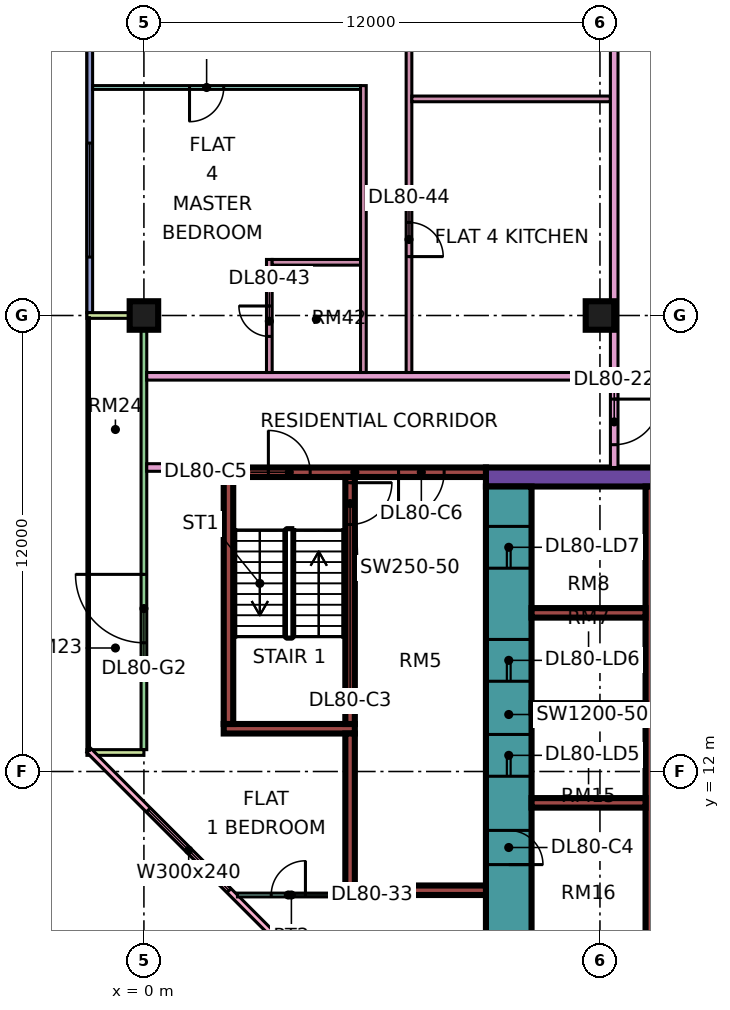
"""IFC4 building model, lengths in metres.
Left out: names, types, materials, properties, quantities, classifications, styles, units other than length and angle.
Written with IfcOpenShell. Run it as: python <this file> out.ifc"""

import sys

from ifc_helpers import new_model, si_unit, direction, frame, frame_2d, origin, origin_2d, place, context, subcontext, project, spatial, rectangle, extrude, element, fill, save


model = new_model("IFC4")
c1 = context("Model", 3, precision=1e-05, world=origin(), true_north=direction((0.0, 1.0)))
c2 = subcontext(c1, "Body", "Model", "MODEL_VIEW")
j1 = project(units=[si_unit("LENGTHUNIT", "METRE"), si_unit("PLANEANGLEUNIT", "RADIAN")], contexts=[c1])
p1 = place(None, origin())
s1 = spatial("IfcSite", under=j1, at=p1, CompositionType="ELEMENT")
p2 = place(p1, origin())
s2 = spatial("IfcBuilding", under=s1, at=p2, CompositionType="ELEMENT")
p3 = place(p2, frame((0.0, 0.0, 346.4)))
s3 = spatial("IfcBuildingStorey", under=s2, at=p3, CompositionType="ELEMENT", Elevation=346.4)
for number, where, z_axis, x_axis in (
    (1, (0.0, 24.0, 0.0), (0.0, 0.0, 1.0), (1.0, 0.0, 0.0)),
    (2, (12.0, 24.0, 0.0), (0.0, 0.0, 1.0), (1.0, 0.0, 0.0)),
):
    element("IfcColumn", number, at=place(p3, frame(where, z_axis=z_axis, x_axis=x_axis)), inside=s3, PredefinedType="COLUMN", context=c2, shape_type="SweptSolid", body=[
        extrude(rectangle(XDim=0.75, YDim=0.75, at=origin_2d()), origin(), (0.0, 0.0, 1.0), 3.75),
    ])
p4 = place(p3, frame((9.0, 19.75, 0.0), z_axis=(0.0, 0.0, 1.0), x_axis=(1.0, 0.0, 0.0)))
e3 = element("IfcWall", 3, at=p4, inside=s3, PredefinedType="SHEAR", context=c2, shape_type="SweptSolid", body=[
    extrude(rectangle(XDim=25.0, YDim=0.5, at=frame_2d((12.5, 0.0))), origin(), (0.0, 0.0, 1.0), 3.75),
])
p5 = place(p4, frame((19.1, 0.0, 0.0)))
e4 = element("IfcOpeningElement", 4, at=p5, cuts=e3, PredefinedType="OPENING", context=c2, shape_type="SweptSolid", body=[
    extrude(rectangle(XDim=1.8, YDim=2.4, at=frame_2d((0.9, 1.2))), frame((0.0, 0.26, 0.0), z_axis=(0.0, -1.0, 0.0), x_axis=(1.0, 0.0, 0.0)), (0.0, 0.0, 1.0), 0.52),
])
p6 = place(p3, frame((9.6, 7.5, 0.0), z_axis=(0.0, 0.0, 1.0), x_axis=(0.0, 1.0, 0.0)))
e5 = element("IfcWall", 5, at=p6, inside=s3, PredefinedType="SHEAR", context=c2, shape_type="SweptSolid", body=[
    extrude(rectangle(XDim=12.0, YDim=1.2, at=frame_2d((6.0, 0.0))), origin(), (0.0, 0.0, 1.0), 3.75),
])
p7 = place(p6, frame((4.375, 0.0, 0.0)))
e6 = element("IfcOpeningElement", 6, at=p7, cuts=e5, PredefinedType="OPENING", context=c2, shape_type="SweptSolid", body=[
    extrude(rectangle(XDim=1.1, YDim=2.2, at=frame_2d((0.55, 1.1))), frame((0.0, 0.61, 0.0), z_axis=(0.0, -1.0, 0.0), x_axis=(1.0, 0.0, 0.0)), (0.0, 0.0, 1.0), 1.22),
])
p8 = place(p6, frame((6.875, 0.0, 0.0)))
e7 = element("IfcOpeningElement", 7, at=p8, cuts=e5, PredefinedType="OPENING", context=c2, shape_type="SweptSolid", body=[
    extrude(rectangle(XDim=1.1, YDim=2.2, at=frame_2d((0.55, 1.1))), frame((0.0, 0.61, 0.0), z_axis=(0.0, -1.0, 0.0), x_axis=(1.0, 0.0, 0.0)), (0.0, 0.0, 1.0), 1.22),
])
p9 = place(p6, frame((9.85, 0.0, 0.0)))
e8 = element("IfcOpeningElement", 8, at=p9, cuts=e5, PredefinedType="OPENING", context=c2, shape_type="SweptSolid", body=[
    extrude(rectangle(XDim=1.1, YDim=2.2, at=frame_2d((0.55, 1.1))), frame((0.0, 0.61, 0.0), z_axis=(0.0, -1.0, 0.0), x_axis=(1.0, 0.0, 0.0)), (0.0, 0.0, 1.0), 1.22),
])
p10 = place(p6, frame((2.05, 0.0, 0.0)))
e9 = element("IfcOpeningElement", 9, at=p10, cuts=e5, PredefinedType="OPENING", context=c2, shape_type="SweptSolid", body=[
    extrude(rectangle(XDim=0.9, YDim=2.1, at=frame_2d((0.45, 1.05))), frame((0.0, 0.61, 0.0), z_axis=(0.0, -1.0, 0.0), x_axis=(1.0, 0.0, 0.0)), (0.0, 0.0, 1.0), 1.22),
])
p11 = place(p3, frame((13.325, 7.5, 0.0), z_axis=(0.0, 0.0, 1.0), x_axis=(0.0, 1.0, 0.0)))
e10 = element("IfcWall", 10, at=p11, inside=s3, PredefinedType="SHEAR", context=c2, shape_type="SweptSolid", body=[
    extrude(rectangle(XDim=12.0, YDim=0.25, at=frame_2d((6.0, 0.0))), origin(), (0.0, 0.0, 1.0), 3.75),
])
for number, where, z_axis, x_axis in (
    (11, (10.2, 11.175, 0.0), (0.0, 0.0, 1.0), (1.0, 0.0, 0.0)),
    (12, (10.2, 13.675, 0.0), (0.0, 0.0, 1.0), (1.0, 0.0, 0.0)),
    (13, (10.2, 16.175, 0.0), (0.0, 0.0, 1.0), (1.0, 0.0, 0.0)),
):
    element("IfcWall", number, at=place(p3, frame(where, z_axis=z_axis, x_axis=x_axis)), inside=s3, PredefinedType="SHEAR", context=c2, shape_type="SweptSolid", body=[
        extrude(rectangle(XDim=3.0, YDim=0.25, at=frame_2d((1.5, 0.0))), origin(), (0.0, 0.0, 1.0), 3.75),
    ])
p12 = place(p3, frame((2.1, 19.875, 0.0), z_axis=(0.0, 0.0, 1.0), x_axis=(1.0, 0.0, 0.0)))
e14 = element("IfcWall", 14, at=p12, inside=s3, PredefinedType="SHEAR", context=c2, shape_type="SweptSolid", body=[
    extrude(rectangle(XDim=6.9, YDim=0.25, at=frame_2d((3.45, 0.0))), origin(), (0.0, 0.0, 1.0), 3.75),
])
p13 = place(p12, frame((1.175, 0.0, 0.0)))
e15 = element("IfcOpeningElement", 15, at=p13, cuts=e14, PredefinedType="OPENING", context=c2, shape_type="SweptSolid", body=[
    extrude(rectangle(XDim=1.1, YDim=2.2, at=frame_2d((0.55, 1.1))), frame((0.0, 0.135, 0.0), z_axis=(0.0, -1.0, 0.0), x_axis=(1.0, 0.0, 0.0)), (0.0, 0.0, 1.0), 0.27),
])
p14 = place(p12, frame((4.6, 0.0, 0.0)))
e16 = element("IfcOpeningElement", 16, at=p14, cuts=e14, PredefinedType="OPENING", context=c2, shape_type="SweptSolid", body=[
    extrude(rectangle(XDim=1.2, YDim=2.2, at=frame_2d((0.6, 1.1))), frame((0.0, 0.135, 0.0), z_axis=(0.0, -1.0, 0.0), x_axis=(1.0, 0.0, 0.0)), (0.0, 0.0, 1.0), 0.27),
])
p15 = place(p3, frame((2.1, 13.125, 0.0), z_axis=(0.0, 0.0, 1.0), x_axis=(1.0, 0.0, 0.0)))
e17 = element("IfcWall", 17, at=p15, inside=s3, PredefinedType="SHEAR", context=c2, shape_type="SweptSolid", body=[
    extrude(rectangle(XDim=3.45, YDim=0.25, at=frame_2d((1.725, 0.0))), origin(), (0.0, 0.0, 1.0), 3.75),
])
p16 = place(p3, frame((2.225, 13.25, 0.0), z_axis=(0.0, 0.0, 1.0), x_axis=(0.0, 1.0, 0.0)))
e18 = element("IfcWall", 18, at=p16, inside=s3, PredefinedType="SHEAR", context=c2, shape_type="SweptSolid", body=[
    extrude(rectangle(XDim=6.5, YDim=0.25, at=frame_2d((3.25, 0.0))), origin(), (0.0, 0.0, 1.0), 3.75),
])
p17 = place(p3, frame((5.425, 13.25, 0.0), z_axis=(0.0, 0.0, 1.0), x_axis=(0.0, 1.0, 0.0)))
e19 = element("IfcWall", 19, at=p17, inside=s3, PredefinedType="SHEAR", context=c2, shape_type="SweptSolid", body=[
    extrude(rectangle(XDim=6.5, YDim=0.25, at=frame_2d((3.25, 0.0))), origin(), (0.0, 0.0, 1.0), 3.75),
])
p18 = place(p17, frame((5.25, 0.0, 0.0)))
e20 = element("IfcOpeningElement", 20, at=p18, cuts=e19, PredefinedType="OPENING", context=c2, shape_type="SweptSolid", body=[
    extrude(rectangle(XDim=1.1, YDim=2.2, at=frame_2d((0.55, 1.1))), frame((0.0, 0.135, 0.0), z_axis=(0.0, -1.0, 0.0), x_axis=(1.0, 0.0, 0.0)), (0.0, 0.0, 1.0), 0.27),
])
p19 = place(p3, frame((5.3, 8.875, 0.0), z_axis=(0.0, 0.0, 1.0), x_axis=(1.0, 0.0, 0.0)))
e21 = element("IfcWall", 21, at=p19, inside=s3, PredefinedType="SHEAR", context=c2, shape_type="SweptSolid", body=[
    extrude(rectangle(XDim=3.7, YDim=0.25, at=frame_2d((1.85, 0.0))), origin(), (0.0, 0.0, 1.0), 3.75),
])
p20 = place(p3, frame((5.425, 9.0, 0.0), z_axis=(0.0, 0.0, 1.0), x_axis=(0.0, 1.0, 0.0)))
e22 = element("IfcWall", 22, at=p20, inside=s3, PredefinedType="SHEAR", context=c2, shape_type="SweptSolid", body=[
    extrude(rectangle(XDim=4.0, YDim=0.25, at=frame_2d((2.0, 0.0))), origin(), (0.0, 0.0, 1.0), 3.75),
])
p21 = place(p3, frame((-1.425, 35.925, 0.0), z_axis=(0.0, 0.0, 1.0), x_axis=(0.0, -1.0, 0.0)))
e23 = element("IfcWall", 23, at=p21, inside=s3, PredefinedType="SOLIDWALL", context=c2, shape_type="SweptSolid", body=[
    extrude(rectangle(XDim=11.85, YDim=0.15, at=frame_2d((5.925, 0.0))), origin(), (0.0, 0.0, 1.0), 3.35),
])
p22 = place(p21, frame((1.462, 0.0, 0.45)))
e24 = element("IfcOpeningElement", 24, at=p22, cuts=e23, PredefinedType="OPENING", context=c2, shape_type="SweptSolid", body=[
    extrude(rectangle(XDim=3.0, YDim=2.4, at=frame_2d((1.5, 1.2))), frame((0.0, 0.085, 0.0), z_axis=(0.0, -1.0, 0.0), x_axis=(1.0, 0.0, 0.0)), (0.0, 0.0, 1.0), 0.17),
])
p23 = place(p21, frame((7.387, 0.0, 0.45)))
e25 = element("IfcOpeningElement", 25, at=p23, cuts=e23, PredefinedType="OPENING", context=c2, shape_type="SweptSolid", body=[
    extrude(rectangle(XDim=3.0, YDim=2.4, at=frame_2d((1.5, 1.2))), frame((0.0, 0.085, 0.0), z_axis=(0.0, -1.0, 0.0), x_axis=(1.0, 0.0, 0.0)), (0.0, 0.0, 1.0), 0.17),
])
p24 = place(p3, frame((0.0, 23.925, 0.0), z_axis=(0.0, 0.0, 1.0), x_axis=(0.0, -1.0, 0.0)))
e26 = element("IfcWall", 26, at=p24, inside=s3, PredefinedType="SOLIDWALL", context=c2, shape_type="SweptSolid", body=[
    extrude(rectangle(XDim=11.35, YDim=0.15, at=frame_2d((5.675, 0.0))), origin(), (0.0, 0.0, 1.0), 3.35),
])
p25 = place(p24, frame((6.738, 0.0, 0.0)))
e27 = element("IfcOpeningElement", 27, at=p25, cuts=e26, PredefinedType="OPENING", context=c2, shape_type="SweptSolid", body=[
    extrude(rectangle(XDim=1.8, YDim=2.4, at=frame_2d((0.9, 1.2))), frame((0.0, 0.085, 0.0), z_axis=(0.0, -1.0, 0.0), x_axis=(1.0, 0.0, 0.0)), (0.0, 0.0, 1.0), 0.17),
])
for number, where, z_axis, x_axis in (
    (28, (-1.5, 24.0, 0.0), (0.0, 0.0, 1.0), (1.0, 0.0, 0.0)),
    (29, (-1.5, 12.5, 0.0), (0.0, 0.0, 1.0), (1.0, 0.0, 0.0)),
):
    element("IfcWall", number, at=place(p3, frame(where, z_axis=z_axis, x_axis=x_axis)), inside=s3, PredefinedType="SOLIDWALL", context=c2, shape_type="SweptSolid", body=[
        extrude(rectangle(XDim=1.5, YDim=0.15, at=frame_2d((0.75, 0.0))), origin(), (0.0, 0.0, 1.0), 3.35),
    ])
p26 = place(p3, frame((-1.447, 12.553, 0.0), z_axis=(0.0, 0.0, 1.0), x_axis=(0.707106781187, -0.707106781187, 0.0)))
e30 = element("IfcWall", 30, at=p26, inside=s3, PredefinedType="SOLIDWALL", context=c2, shape_type="SweptSolid", body=[
    extrude(rectangle(XDim=19.799, YDim=0.15, at=frame_2d((9.899, 0.0))), origin(), (0.0, 0.0, 1.0), 3.35),
])
p27 = place(p26, frame((2.212, 0.0, 0.45)))
e31 = element("IfcOpeningElement", 31, at=p27, cuts=e30, PredefinedType="OPENING", context=c2, shape_type="SweptSolid", body=[
    extrude(rectangle(XDim=3.0, YDim=2.4, at=frame_2d((1.5, 1.2))), frame((0.0, 0.085, 0.0), z_axis=(0.0, -1.0, 0.0), x_axis=(1.0, 0.0, 0.0)), (0.0, 0.0, 1.0), 0.17),
])
p28 = place(p26, frame((10.216, 0.0, 0.45)))
e32 = element("IfcOpeningElement", 32, at=p28, cuts=e30, PredefinedType="OPENING", context=c2, shape_type="SweptSolid", body=[
    extrude(rectangle(XDim=3.0, YDim=2.4, at=frame_2d((1.5, 1.2))), frame((0.0, 0.085, 0.0), z_axis=(0.0, -1.0, 0.0), x_axis=(1.0, 0.0, 0.0)), (0.0, 0.0, 1.0), 0.17),
])
p29 = place(p3, frame((-1.35, 30.0, 0.0), z_axis=(0.0, 0.0, 1.0), x_axis=(1.0, 0.0, 0.0)))
e33 = element("IfcWall", 33, at=p29, inside=s3, PredefinedType="PARTITIONING", context=c2, shape_type="SweptSolid", body=[
    extrude(rectangle(XDim=7.05, YDim=0.1, at=frame_2d((3.525, 0.0))), origin(), (0.0, 0.0, 1.0), 3.35),
])
p30 = place(p29, frame((2.55, 0.0, 0.0)))
e34 = element("IfcOpeningElement", 34, at=p30, cuts=e33, PredefinedType="OPENING", context=c2, shape_type="SweptSolid", body=[
    extrude(rectangle(XDim=0.9, YDim=2.1, at=frame_2d((0.45, 1.05))), frame((0.0, 0.06, 0.0), z_axis=(0.0, -1.0, 0.0), x_axis=(1.0, 0.0, 0.0)), (0.0, 0.0, 1.0), 0.12),
])
p31 = place(p3, frame((0.074, 20.0, 0.0), z_axis=(0.0, 0.0, 1.0), x_axis=(1.0, 0.0, 0.0)))
e35 = element("IfcWall", 35, at=p31, inside=s3, PredefinedType="PARTITIONING", context=c2, shape_type="SweptSolid", body=[
    extrude(rectangle(XDim=2.026, YDim=0.2, at=frame_2d((1.013, 0.0))), origin(), (0.0, 0.0, 1.0), 3.35),
])
p32 = place(p3, frame((0.074, 22.4, 0.0), z_axis=(0.0, 0.0, 1.0), x_axis=(1.0, 0.0, 0.0)))
e36 = element("IfcWall", 36, at=p32, inside=s3, PredefinedType="PARTITIONING", context=c2, shape_type="SweptSolid", body=[
    extrude(rectangle(XDim=12.201, YDim=0.2, at=frame_2d((6.101, 0.0))), origin(), (0.0, 0.0, 1.0), 3.35),
])
p33 = place(p3, frame((2.461, 8.75, 0.0), z_axis=(0.0, 0.0, 1.0), x_axis=(1.0, 0.0, 0.0)))
e37 = element("IfcWall", 37, at=p33, inside=s3, PredefinedType="PARTITIONING", context=c2, shape_type="SweptSolid", body=[
    extrude(rectangle(XDim=2.839, YDim=0.1, at=frame_2d((1.419, 0.0))), origin(), (0.0, 0.0, 1.0), 3.35),
])
p34 = place(p33, frame((0.889, 0.0, 0.0)))
e38 = element("IfcOpeningElement", 38, at=p34, cuts=e37, PredefinedType="OPENING", context=c2, shape_type="SweptSolid", body=[
    extrude(rectangle(XDim=0.9, YDim=2.1, at=frame_2d((0.45, 1.05))), frame((0.0, 0.06, 0.0), z_axis=(0.0, -1.0, 0.0), x_axis=(1.0, 0.0, 0.0)), (0.0, 0.0, 1.0), 0.12),
])
p35 = place(p3, frame((3.3, 22.5, 0.0), z_axis=(0.0, 0.0, 1.0), x_axis=(0.0, 1.0, 0.0)))
e39 = element("IfcWall", 39, at=p35, inside=s3, PredefinedType="PARTITIONING", context=c2, shape_type="SweptSolid", body=[
    extrude(rectangle(XDim=2.975, YDim=0.15, at=frame_2d((1.488, 0.0))), origin(), (0.0, 0.0, 1.0), 3.35),
])
p36 = place(p35, frame((0.95, 0.0, 0.0)))
e40 = element("IfcOpeningElement", 40, at=p36, cuts=e39, PredefinedType="OPENING", context=c2, shape_type="SweptSolid", body=[
    extrude(rectangle(XDim=0.8, YDim=2.1, at=frame_2d((0.4, 1.05))), frame((0.0, 0.085, 0.0), z_axis=(0.0, -1.0, 0.0), x_axis=(1.0, 0.0, 0.0)), (0.0, 0.0, 1.0), 0.17),
])
p37 = place(p3, frame((3.375, 25.4, 0.0), z_axis=(0.0, 0.0, 1.0), x_axis=(1.0, 0.0, 0.0)))
e41 = element("IfcWall", 41, at=p37, inside=s3, PredefinedType="PARTITIONING", context=c2, shape_type="SweptSolid", body=[
    extrude(rectangle(XDim=2.325, YDim=0.15, at=frame_2d((1.163, 0.0))), origin(), (0.0, 0.0, 1.0), 3.35),
])
p38 = place(p3, frame((5.775, 22.5, 0.0), z_axis=(0.0, 0.0, 1.0), x_axis=(0.0, 1.0, 0.0)))
e42 = element("IfcWall", 42, at=p38, inside=s3, PredefinedType="PARTITIONING", context=c2, shape_type="SweptSolid", body=[
    extrude(rectangle(XDim=7.55, YDim=0.15, at=frame_2d((3.775, 0.0))), origin(), (0.0, 0.0, 1.0), 3.35),
])
p39 = place(p3, frame((6.975, 22.5, 0.0), z_axis=(0.0, 0.0, 1.0), x_axis=(0.0, 1.0, 0.0)))
e43 = element("IfcWall", 43, at=p39, inside=s3, PredefinedType="PARTITIONING", context=c2, shape_type="SweptSolid", body=[
    extrude(rectangle(XDim=11.175, YDim=0.15, at=frame_2d((5.587, 0.0))), origin(), (0.0, 0.0, 1.0), 3.35),
])
p40 = place(p39, frame((3.05, 0.0, 0.0)))
e44 = element("IfcOpeningElement", 44, at=p40, cuts=e43, PredefinedType="OPENING", context=c2, shape_type="SweptSolid", body=[
    extrude(rectangle(XDim=0.9, YDim=2.1, at=frame_2d((0.45, 1.05))), frame((0.0, 0.085, 0.0), z_axis=(0.0, -1.0, 0.0), x_axis=(1.0, 0.0, 0.0)), (0.0, 0.0, 1.0), 0.17),
])
p41 = place(p3, frame((7.05, 29.7, 0.0), z_axis=(0.0, 0.0, 1.0), x_axis=(1.0, 0.0, 0.0)))
e45 = element("IfcWall", 45, at=p41, inside=s3, PredefinedType="PARTITIONING", context=c2, shape_type="SweptSolid", body=[
    extrude(rectangle(XDim=5.225, YDim=0.15, at=frame_2d((2.612, 0.0))), origin(), (0.0, 0.0, 1.0), 3.35),
])
p42 = place(p3, frame((12.375, 20.0, 0.0), z_axis=(0.0, 0.0, 1.0), x_axis=(0.0, 1.0, 0.0)))
e46 = element("IfcWall", 46, at=p42, inside=s3, PredefinedType="PARTITIONING", context=c2, shape_type="SweptSolid", body=[
    extrude(rectangle(XDim=33.926, YDim=0.2, at=frame_2d((16.963, 0.0))), origin(), (0.0, 0.0, 1.0), 3.35),
])
p43 = place(p42, frame((16.95, 0.0, 0.0)))
e47 = element("IfcOpeningElement", 47, at=p43, cuts=e46, PredefinedType="OPENING", context=c2, shape_type="SweptSolid", body=[
    extrude(rectangle(XDim=1.0, YDim=2.1, at=frame_2d((0.5, 1.05))), frame((0.0, 0.11, 0.0), z_axis=(0.0, -1.0, 0.0), x_axis=(1.0, 0.0, 0.0)), (0.0, 0.0, 1.0), 0.22),
])
p44 = place(p42, frame((0.6, 0.0, 0.0)))
e48 = element("IfcOpeningElement", 48, at=p44, cuts=e46, PredefinedType="OPENING", context=c2, shape_type="SweptSolid", body=[
    extrude(rectangle(XDim=1.2, YDim=2.1, at=frame_2d((0.6, 1.05))), frame((0.0, 0.11, 0.0), z_axis=(0.0, -1.0, 0.0), x_axis=(1.0, 0.0, 0.0)), (0.0, 0.0, 1.0), 0.22),
])
p45 = place(p42, frame((14.25, 0.0, 0.0)))
e49 = element("IfcOpeningElement", 49, at=p45, cuts=e46, PredefinedType="OPENING", context=c2, shape_type="SweptSolid", body=[
    extrude(rectangle(XDim=1.0, YDim=2.1, at=frame_2d((0.5, 1.05))), frame((0.0, 0.11, 0.0), z_axis=(0.0, -1.0, 0.0), x_axis=(1.0, 0.0, 0.0)), (0.0, 0.0, 1.0), 0.22),
])
p46 = place(p23, origin())
e50 = element("IfcWindow", 50, at=p46, inside=s3, PartitioningType="SINGLE_PANEL", PredefinedType="WINDOW", context=c2, shape_type="SweptSolid", body=[
    extrude(rectangle(XDim=3.0, YDim=2.4, at=frame_2d((1.5, 1.2))), frame((0.0, 0.03, 0.0), z_axis=(0.0, -1.0, 0.0), x_axis=(1.0, 0.0, 0.0)), (0.0, 0.0, 1.0), 0.06),
])
fill(e25, e50)
p47 = place(p25, frame((1.8, 0.0, 0.0), z_axis=(0.0, 0.0, 1.0), x_axis=(-1.0, 0.0, 0.0)))
e51 = element("IfcDoor", 51, at=p47, inside=s3, OperationType="DOUBLE_DOOR_SINGLE_SWING", PredefinedType="DOOR", context=c2, shape_type="SweptSolid", body=[
    extrude(rectangle(XDim=1.8, YDim=2.4, at=frame_2d((0.9, 1.2))), frame((0.0, 0.025, 0.0), z_axis=(0.0, -1.0, 0.0), x_axis=(1.0, 0.0, 0.0)), (0.0, 0.0, 1.0), 0.05),
])
fill(e27, e51)
p48 = place(p27, origin())
e52 = element("IfcWindow", 52, at=p48, inside=s3, PartitioningType="SINGLE_PANEL", PredefinedType="WINDOW", context=c2, shape_type="SweptSolid", body=[
    extrude(rectangle(XDim=3.0, YDim=2.4, at=frame_2d((1.5, 1.2))), frame((0.0, 0.03, 0.0), z_axis=(0.0, -1.0, 0.0), x_axis=(1.0, 0.0, 0.0)), (0.0, 0.0, 1.0), 0.06),
])
fill(e31, e52)
p49 = place(p7, origin())
e53 = element("IfcDoor", 53, at=p49, inside=s3, OperationType="DOUBLE_DOOR_SLIDING", PredefinedType="DOOR", context=c2, shape_type="SweptSolid", body=[
    extrude(rectangle(XDim=1.1, YDim=2.2, at=frame_2d((0.55, 1.1))), frame((0.0, 0.025, 0.0), z_axis=(0.0, -1.0, 0.0), x_axis=(1.0, 0.0, 0.0)), (0.0, 0.0, 1.0), 0.05),
])
fill(e6, e53)
p50 = place(p8, origin())
e54 = element("IfcDoor", 54, at=p50, inside=s3, OperationType="DOUBLE_DOOR_SLIDING", PredefinedType="DOOR", context=c2, shape_type="SweptSolid", body=[
    extrude(rectangle(XDim=1.1, YDim=2.2, at=frame_2d((0.55, 1.1))), frame((0.0, 0.025, 0.0), z_axis=(0.0, -1.0, 0.0), x_axis=(1.0, 0.0, 0.0)), (0.0, 0.0, 1.0), 0.05),
])
fill(e7, e54)
p51 = place(p9, origin())
e55 = element("IfcDoor", 55, at=p51, inside=s3, OperationType="DOUBLE_DOOR_SLIDING", PredefinedType="DOOR", context=c2, shape_type="SweptSolid", body=[
    extrude(rectangle(XDim=1.1, YDim=2.2, at=frame_2d((0.55, 1.1))), frame((0.0, 0.025, 0.0), z_axis=(0.0, -1.0, 0.0), x_axis=(1.0, 0.0, 0.0)), (0.0, 0.0, 1.0), 0.05),
])
fill(e8, e55)
p52 = place(p18, origin())
e56 = element("IfcDoor", 56, at=p52, inside=s3, OperationType="SINGLE_SWING_RIGHT", PredefinedType="DOOR", context=c2, shape_type="SweptSolid", body=[
    extrude(rectangle(XDim=1.1, YDim=2.2, at=frame_2d((0.55, 1.1))), frame((0.0, 0.025, 0.0), z_axis=(0.0, -1.0, 0.0), x_axis=(1.0, 0.0, 0.0)), (0.0, 0.0, 1.0), 0.05),
])
fill(e20, e56)
p53 = place(p10, frame((0.9, 0.0, 0.0), z_axis=(0.0, 0.0, 1.0), x_axis=(-1.0, 0.0, 0.0)))
e57 = element("IfcDoor", 57, at=p53, inside=s3, OperationType="SINGLE_SWING_LEFT", PredefinedType="DOOR", context=c2, shape_type="SweptSolid", body=[
    extrude(rectangle(XDim=0.9, YDim=2.1, at=frame_2d((0.45, 1.05))), frame((0.0, 0.025, 0.0), z_axis=(0.0, -1.0, 0.0), x_axis=(1.0, 0.0, 0.0)), (0.0, 0.0, 1.0), 0.05),
])
fill(e9, e57)
p54 = place(p13, origin())
e58 = element("IfcDoor", 58, at=p54, inside=s3, OperationType="SINGLE_SWING_LEFT", PredefinedType="DOOR", context=c2, shape_type="SweptSolid", body=[
    extrude(rectangle(XDim=1.1, YDim=2.2, at=frame_2d((0.55, 1.1))), frame((0.0, 0.025, 0.0), z_axis=(0.0, -1.0, 0.0), x_axis=(1.0, 0.0, 0.0)), (0.0, 0.0, 1.0), 0.05),
])
fill(e15, e58)
p55 = place(p14, frame((1.2, 0.0, 0.0), z_axis=(0.0, 0.0, 1.0), x_axis=(-1.0, 0.0, 0.0)))
e59 = element("IfcDoor", 59, at=p55, inside=s3, OperationType="SINGLE_SWING_LEFT", PredefinedType="DOOR", context=c2, shape_type="SweptSolid", body=[
    extrude(rectangle(XDim=1.2, YDim=2.2, at=frame_2d((0.6, 1.1))), frame((0.0, 0.025, 0.0), z_axis=(0.0, -1.0, 0.0), x_axis=(1.0, 0.0, 0.0)), (0.0, 0.0, 1.0), 0.05),
])
fill(e16, e59)
p56 = place(p44, origin())
e60 = element("IfcDoor", 60, at=p56, inside=s3, OperationType="SINGLE_SWING_RIGHT", PredefinedType="DOOR", context=c2, shape_type="SweptSolid", body=[
    extrude(rectangle(XDim=1.2, YDim=2.1, at=frame_2d((0.6, 1.05))), frame((0.0, 0.025, 0.0), z_axis=(0.0, -1.0, 0.0), x_axis=(1.0, 0.0, 0.0)), (0.0, 0.0, 1.0), 0.05),
])
fill(e48, e60)
p57 = place(p34, frame((0.9, 0.0, 0.0), z_axis=(0.0, 0.0, 1.0), x_axis=(-1.0, 0.0, 0.0)))
e61 = element("IfcDoor", 61, at=p57, inside=s3, OperationType="SINGLE_SWING_RIGHT", PredefinedType="DOOR", context=c2, shape_type="SweptSolid", body=[
    extrude(rectangle(XDim=0.9, YDim=2.1, at=frame_2d((0.45, 1.05))), frame((0.0, 0.025, 0.0), z_axis=(0.0, -1.0, 0.0), x_axis=(1.0, 0.0, 0.0)), (0.0, 0.0, 1.0), 0.05),
])
fill(e38, e61)
p58 = place(p30, frame((0.9, 0.0, 0.0), z_axis=(0.0, 0.0, 1.0), x_axis=(-1.0, 0.0, 0.0)))
e62 = element("IfcDoor", 62, at=p58, inside=s3, OperationType="SINGLE_SWING_LEFT", PredefinedType="DOOR", context=c2, shape_type="SweptSolid", body=[
    extrude(rectangle(XDim=0.9, YDim=2.1, at=frame_2d((0.45, 1.05))), frame((0.0, 0.025, 0.0), z_axis=(0.0, -1.0, 0.0), x_axis=(1.0, 0.0, 0.0)), (0.0, 0.0, 1.0), 0.05),
])
fill(e34, e62)
p59 = place(p36, frame((0.8, 0.0, 0.0), z_axis=(0.0, 0.0, 1.0), x_axis=(-1.0, 0.0, 0.0)))
e63 = element("IfcDoor", 63, at=p59, inside=s3, OperationType="SINGLE_SWING_RIGHT", PredefinedType="DOOR", context=c2, shape_type="SweptSolid", body=[
    extrude(rectangle(XDim=0.8, YDim=2.1, at=frame_2d((0.4, 1.05))), frame((0.0, 0.025, 0.0), z_axis=(0.0, -1.0, 0.0), x_axis=(1.0, 0.0, 0.0)), (0.0, 0.0, 1.0), 0.05),
])
fill(e40, e63)
p60 = place(p40, frame((0.9, 0.0, 0.0), z_axis=(0.0, 0.0, 1.0), x_axis=(-1.0, 0.0, 0.0)))
e64 = element("IfcDoor", 64, at=p60, inside=s3, OperationType="SINGLE_SWING_LEFT", PredefinedType="DOOR", context=c2, shape_type="SweptSolid", body=[
    extrude(rectangle(XDim=0.9, YDim=2.1, at=frame_2d((0.45, 1.05))), frame((0.0, 0.025, 0.0), z_axis=(0.0, -1.0, 0.0), x_axis=(1.0, 0.0, 0.0)), (0.0, 0.0, 1.0), 0.05),
])
fill(e44, e64)
save(model, sys.argv[1])
